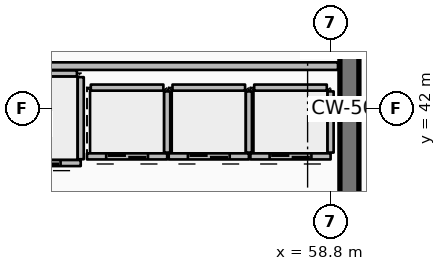
"""IFC4 building model, lengths in metres.
Left out: names, types, materials, properties, quantities, classifications, styles, units other than length and angle.
Written with IfcOpenShell. Run it as: python <this file> out.ifc"""

import sys

from ifc_helpers import new_model, si_unit, direction, frame, frame_2d, origin, place, context, subcontext, project, spatial, rectangle, extrude, element, fill, save


model = new_model("IFC4")
c1 = context("Model", 3, precision=1e-05, world=origin(), true_north=direction((0.0, 1.0)))
c2 = subcontext(c1, "Body", "Model", "MODEL_VIEW")
j1 = project(units=[si_unit("LENGTHUNIT", "METRE"), si_unit("PLANEANGLEUNIT", "RADIAN")], contexts=[c1])
p1 = place(None, origin())
s1 = spatial("IfcSite", under=j1, at=p1, CompositionType="ELEMENT")
p2 = place(p1, origin())
s2 = spatial("IfcBuilding", under=s1, at=p2, CompositionType="ELEMENT")
p3 = place(p2, frame((0.0, 0.0, 326.3)))
s3 = spatial("IfcBuildingStorey", under=s2, at=p3, CompositionType="ELEMENT", Elevation=326.3)
p4 = place(p3, frame((59.3, 34.0, 0.0), z_axis=(0.0, 0.0, 1.0), x_axis=(0.0, 1.0, 0.0)))
e1 = element("IfcWall", 1, at=p4, inside=s3, PredefinedType="SHEAR", context=c2, shape_type="SweptSolid", body=[
    extrude(rectangle(XDim=16.0, YDim=0.5, at=frame_2d((8.0, 0.0))), origin(), (0.0, 0.0, 1.0), 4.2),
])
p5 = place(p3, frame((54.505, 40.745, 0.0), z_axis=(0.0, 0.0, 1.0), x_axis=(-1.0, 0.0, 0.0)))
e2 = element("IfcWall", 2, at=p5, inside=s3, PredefinedType="PARTITIONING", context=c2, shape_type="SweptSolid", body=[
    extrude(rectangle(XDim=2.11, YDim=0.16, at=frame_2d((1.055, 0.0))), origin(), (0.0, 0.0, 1.0), 3.94),
])
p6 = place(p5, frame((0.505, 0.0, 0.0)))
e3 = element("IfcOpeningElement", 3, at=p6, cuts=e2, PredefinedType="OPENING", context=c2, shape_type="SweptSolid", body=[
    extrude(rectangle(XDim=1.1, YDim=2.1, at=frame_2d((0.55, 1.05))), frame((0.0, 0.09, 0.0), z_axis=(0.0, -1.0, 0.0), x_axis=(1.0, 0.0, 0.0)), (0.0, 0.0, 1.0), 0.18),
])
p7 = place(p3, frame((54.505, 40.845, 0.0), z_axis=(0.0, 0.0, 1.0), x_axis=(0.0, 1.0, 0.0)))
e4 = element("IfcWall", 4, at=p7, inside=s3, PredefinedType="PARTITIONING", context=c2, shape_type="SweptSolid", body=[
    extrude(rectangle(XDim=1.61, YDim=0.16, at=frame_2d((0.805, 0.0))), origin(), (0.0, 0.0, 1.0), 3.94),
])
p8 = place(p3, frame((52.495, 42.555, 0.0), z_axis=(0.0, 0.0, 1.0), x_axis=(1.0, 0.0, 0.0)))
e5 = element("IfcWall", 5, at=p8, inside=s3, PredefinedType="PARTITIONING", context=c2, shape_type="SweptSolid", body=[
    extrude(rectangle(XDim=1.91, YDim=0.16, at=frame_2d((0.955, 0.0))), origin(), (0.0, 0.0, 1.0), 3.94),
])
p9 = place(p3, frame((56.655, 40.745, 0.0), z_axis=(0.0, 0.0, 1.0), x_axis=(-1.0, 0.0, 0.0)))
e6 = element("IfcWall", 6, at=p9, inside=s3, PredefinedType="PARTITIONING", context=c2, shape_type="SweptSolid", body=[
    extrude(rectangle(XDim=2.11, YDim=0.16, at=frame_2d((1.055, 0.0))), origin(), (0.0, 0.0, 1.0), 3.94),
])
p10 = place(p9, frame((0.505, 0.0, 0.0)))
e7 = element("IfcOpeningElement", 7, at=p10, cuts=e6, PredefinedType="OPENING", context=c2, shape_type="SweptSolid", body=[
    extrude(rectangle(XDim=1.1, YDim=2.1, at=frame_2d((0.55, 1.05))), frame((0.0, 0.09, 0.0), z_axis=(0.0, -1.0, 0.0), x_axis=(1.0, 0.0, 0.0)), (0.0, 0.0, 1.0), 0.18),
])
p11 = place(p3, frame((56.655, 40.845, 0.0), z_axis=(0.0, 0.0, 1.0), x_axis=(0.0, 1.0, 0.0)))
e8 = element("IfcWall", 8, at=p11, inside=s3, PredefinedType="PARTITIONING", context=c2, shape_type="SweptSolid", body=[
    extrude(rectangle(XDim=1.61, YDim=0.16, at=frame_2d((0.805, 0.0))), origin(), (0.0, 0.0, 1.0), 3.94),
])
p12 = place(p3, frame((54.645, 42.555, 0.0), z_axis=(0.0, 0.0, 1.0), x_axis=(1.0, 0.0, 0.0)))
e9 = element("IfcWall", 9, at=p12, inside=s3, PredefinedType="PARTITIONING", context=c2, shape_type="SweptSolid", body=[
    extrude(rectangle(XDim=1.91, YDim=0.16, at=frame_2d((0.955, 0.0))), origin(), (0.0, 0.0, 1.0), 3.94),
])
p13 = place(p3, frame((58.805, 40.745, 0.0), z_axis=(0.0, 0.0, 1.0), x_axis=(-1.0, 0.0, 0.0)))
e10 = element("IfcWall", 10, at=p13, inside=s3, PredefinedType="PARTITIONING", context=c2, shape_type="SweptSolid", body=[
    extrude(rectangle(XDim=2.11, YDim=0.16, at=frame_2d((1.055, 0.0))), origin(), (0.0, 0.0, 1.0), 3.94),
])
p14 = place(p13, frame((0.505, 0.0, 0.0)))
e11 = element("IfcOpeningElement", 11, at=p14, cuts=e10, PredefinedType="OPENING", context=c2, shape_type="SweptSolid", body=[
    extrude(rectangle(XDim=1.1, YDim=2.1, at=frame_2d((0.55, 1.05))), frame((0.0, 0.09, 0.0), z_axis=(0.0, -1.0, 0.0), x_axis=(1.0, 0.0, 0.0)), (0.0, 0.0, 1.0), 0.18),
])
p15 = place(p3, frame((58.805, 40.845, 0.0), z_axis=(0.0, 0.0, 1.0), x_axis=(0.0, 1.0, 0.0)))
e12 = element("IfcWall", 12, at=p15, inside=s3, PredefinedType="PARTITIONING", context=c2, shape_type="SweptSolid", body=[
    extrude(rectangle(XDim=1.61, YDim=0.16, at=frame_2d((0.805, 0.0))), origin(), (0.0, 0.0, 1.0), 3.94),
])
p16 = place(p3, frame((56.795, 42.555, 0.0), z_axis=(0.0, 0.0, 1.0), x_axis=(1.0, 0.0, 0.0)))
e13 = element("IfcWall", 13, at=p16, inside=s3, PredefinedType="PARTITIONING", context=c2, shape_type="SweptSolid", body=[
    extrude(rectangle(XDim=1.91, YDim=0.16, at=frame_2d((0.955, 0.0))), origin(), (0.0, 0.0, 1.0), 3.94),
])
p17 = place(p3, frame((52.23, 40.57, 0.0), z_axis=(0.0, 0.0, 1.0), x_axis=(-1.0, 0.0, 0.0)))
e14 = element("IfcWall", 14, at=p17, inside=s3, PredefinedType="PARTITIONING", context=c2, shape_type="SweptSolid", body=[
    extrude(rectangle(XDim=2.16, YDim=0.16, at=frame_2d((1.08, 0.0))), origin(), (0.0, 0.0, 1.0), 3.94),
])
p18 = place(p17, frame((0.53, 0.0, 0.0)))
e15 = element("IfcOpeningElement", 15, at=p18, cuts=e14, PredefinedType="OPENING", context=c2, shape_type="SweptSolid", body=[
    extrude(rectangle(XDim=1.1, YDim=2.1, at=frame_2d((0.55, 1.05))), frame((0.0, 0.09, 0.0), z_axis=(0.0, -1.0, 0.0), x_axis=(1.0, 0.0, 0.0)), (0.0, 0.0, 1.0), 0.18),
])
p19 = place(p3, frame((52.23, 40.67, 0.0), z_axis=(0.0, 0.0, 1.0), x_axis=(0.0, 1.0, 0.0)))
e16 = element("IfcWall", 16, at=p19, inside=s3, PredefinedType="PARTITIONING", context=c2, shape_type="SweptSolid", body=[
    extrude(rectangle(XDim=2.16, YDim=0.16, at=frame_2d((1.08, 0.0))), origin(), (0.0, 0.0, 1.0), 3.94),
])
p20 = place(p3, frame((50.17, 42.93, 0.0), z_axis=(0.0, 0.0, 1.0), x_axis=(1.0, 0.0, 0.0)))
e17 = element("IfcWall", 17, at=p20, inside=s3, PredefinedType="PARTITIONING", context=c2, shape_type="SweptSolid", body=[
    extrude(rectangle(XDim=1.96, YDim=0.16, at=frame_2d((0.98, 0.0))), origin(), (0.0, 0.0, 1.0), 3.94),
])
p21 = place(p3, frame((50.12, 43.12, 0.0), z_axis=(0.0, 0.0, 1.0), x_axis=(1.0, 0.0, 0.0)))
e18 = element("IfcWall", 18, at=p21, inside=s3, PredefinedType="PARTITIONING", context=c2, shape_type="SweptSolid", body=[
    extrude(rectangle(XDim=8.88, YDim=0.2, at=frame_2d((4.44, 0.0))), origin(), (0.0, 0.0, 1.0), 3.94),
])
p22 = place(p6, origin())
e19 = element("IfcDoor", 19, at=p22, inside=s3, OperationType="DOUBLE_DOOR_SLIDING", PredefinedType="DOOR", context=c2, shape_type="SweptSolid", body=[
    extrude(rectangle(XDim=1.1, YDim=2.1, at=frame_2d((0.55, 1.05))), frame((0.0, 0.025, 0.0), z_axis=(0.0, -1.0, 0.0), x_axis=(1.0, 0.0, 0.0)), (0.0, 0.0, 1.0), 0.05),
])
fill(e3, e19)
p23 = place(p10, origin())
e20 = element("IfcDoor", 20, at=p23, inside=s3, OperationType="DOUBLE_DOOR_SLIDING", PredefinedType="DOOR", context=c2, shape_type="SweptSolid", body=[
    extrude(rectangle(XDim=1.1, YDim=2.1, at=frame_2d((0.55, 1.05))), frame((0.0, 0.025, 0.0), z_axis=(0.0, -1.0, 0.0), x_axis=(1.0, 0.0, 0.0)), (0.0, 0.0, 1.0), 0.05),
])
fill(e7, e20)
p24 = place(p14, origin())
e21 = element("IfcDoor", 21, at=p24, inside=s3, OperationType="DOUBLE_DOOR_SLIDING", PredefinedType="DOOR", context=c2, shape_type="SweptSolid", body=[
    extrude(rectangle(XDim=1.1, YDim=2.1, at=frame_2d((0.55, 1.05))), frame((0.0, 0.025, 0.0), z_axis=(0.0, -1.0, 0.0), x_axis=(1.0, 0.0, 0.0)), (0.0, 0.0, 1.0), 0.05),
])
fill(e11, e21)
p25 = place(p18, origin())
e22 = element("IfcDoor", 22, at=p25, inside=s3, OperationType="DOUBLE_DOOR_SLIDING", PredefinedType="DOOR", context=c2, shape_type="SweptSolid", body=[
    extrude(rectangle(XDim=1.1, YDim=2.1, at=frame_2d((0.55, 1.05))), frame((0.0, 0.025, 0.0), z_axis=(0.0, -1.0, 0.0), x_axis=(1.0, 0.0, 0.0)), (0.0, 0.0, 1.0), 0.05),
])
fill(e15, e22)
save(model, sys.argv[1])
